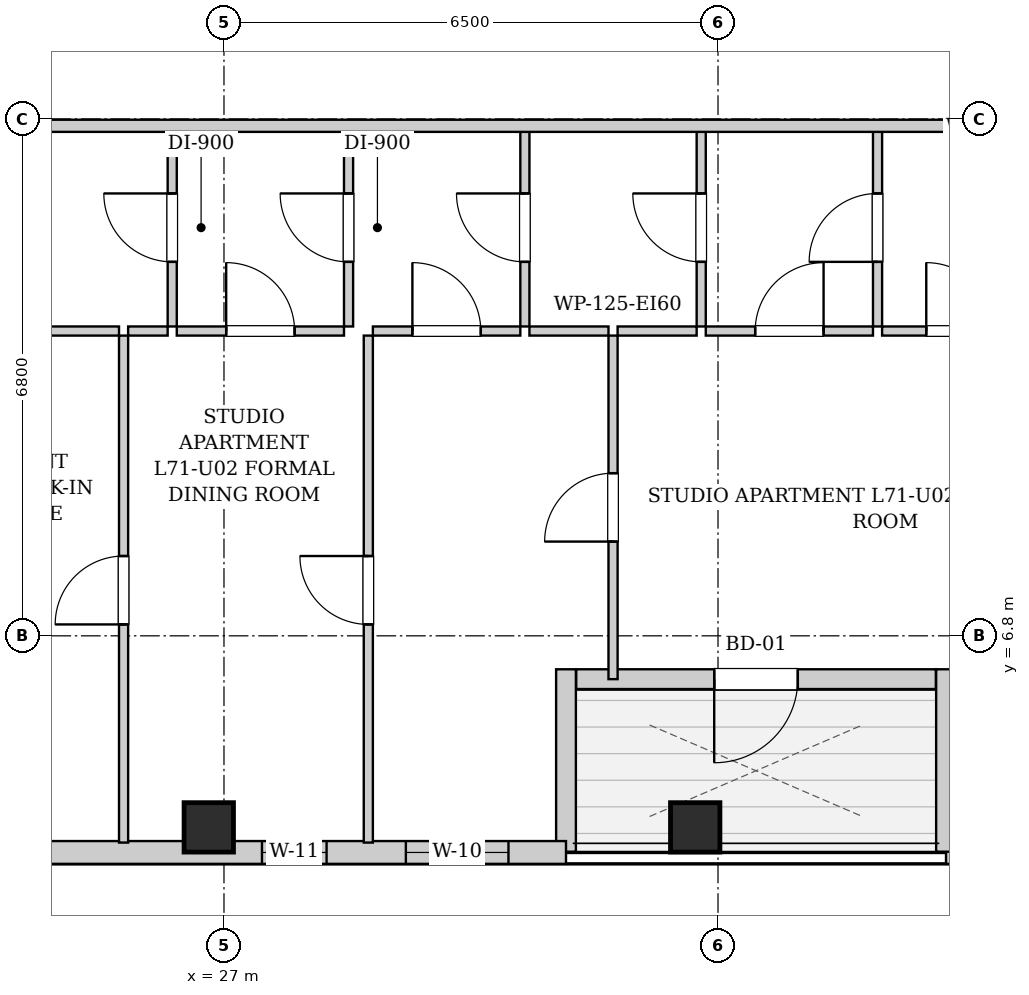
"""IFC4 building model, lengths in metres.
Left out: names, types, materials, properties, quantities, classifications, styles, units other than length and angle.
Written with IfcOpenShell. Run it as: python <this file> out.ifc"""

import sys

from ifc_helpers import new_model, si_unit, direction, frame, frame_2d, origin, origin_2d, place, context, subcontext, project, spatial, rectangle, extrude, element, fill, save


model = new_model("IFC4")
c1 = context("Model", 3, precision=1e-05, world=origin(), true_north=direction((0.0, 1.0)))
c2 = subcontext(c1, "Body", "Model", "MODEL_VIEW")
j1 = project(units=[si_unit("LENGTHUNIT", "METRE"), si_unit("PLANEANGLEUNIT", "RADIAN")], contexts=[c1])
p1 = place(None, origin())
s1 = spatial("IfcSite", under=j1, at=p1, CompositionType="ELEMENT")
p2 = place(p1, origin())
s2 = spatial("IfcBuilding", under=s1, at=p2, CompositionType="ELEMENT")
p3 = place(p2, frame((0.0, 0.0, 244.5)))
s3 = spatial("IfcBuildingStorey", under=s2, at=p3, CompositionType="ELEMENT", Elevation=244.5)
for number, where, z_axis, x_axis in (
    (1, (26.8, 4.28, 0.0), (0.0, 0.0, 1.0), (1.0, 0.0, 0.0)),
    (2, (33.2, 4.28, 0.0), (0.0, 0.0, 1.0), (1.0, 0.0, 0.0)),
):
    element("IfcColumn", number, at=place(p3, frame(where, z_axis=z_axis, x_axis=x_axis)), inside=s3, PredefinedType="COLUMN", context=c2, shape_type="SweptSolid", body=[
        extrude(rectangle(XDim=0.65, YDim=0.65, at=origin_2d()), origin(), (0.0, 0.0, 1.0), 3.4),
    ])
p4 = place(p3, frame((37.8, 3.95, 0.0), z_axis=(0.0, 0.0, 1.0), x_axis=(-1.0, 0.0, 0.0)))
e3 = element("IfcWall", 3, at=p4, inside=s3, PredefinedType="SOLIDWALL", context=c2, shape_type="SweptSolid", body=[
    extrude(rectangle(XDim=1.3, YDim=0.3, at=frame_2d((0.65, 0.0))), origin(), (0.0, 0.0, 1.0), 3.14),
])
p5 = place(p3, frame((36.5, 3.96, 0.0), z_axis=(0.0, 0.0, 1.0), x_axis=(0.0, 1.0, 0.0)))
e4 = element("IfcWall", 4, at=p5, inside=s3, PredefinedType="SOLIDWALL", context=c2, shape_type="SweptSolid", body=[
    extrude(rectangle(XDim=2.4, YDim=0.26, at=frame_2d((1.2, 0.0))), origin(), (0.0, 0.0, 1.0), 3.14),
])
p6 = place(p3, frame((36.366, 6.23, 0.0), z_axis=(0.0, 0.0, 1.0), x_axis=(-1.0, 0.0, 0.0)))
e5 = element("IfcWall", 5, at=p6, inside=s3, PredefinedType="SOLIDWALL", context=c2, shape_type="SweptSolid", body=[
    extrude(rectangle(XDim=4.732, YDim=0.26, at=frame_2d((2.366, 0.0))), origin(), (0.0, 0.0, 1.0), 3.14),
])
p7 = place(p6, frame((1.816, 0.0, 0.0)))
e6 = element("IfcOpeningElement", 6, at=p7, cuts=e5, PredefinedType="OPENING", context=c2, shape_type="SweptSolid", body=[
    extrude(rectangle(XDim=1.1, YDim=2.0, at=frame_2d((0.55, 1.0))), frame((0.0, 0.14, 0.0), z_axis=(0.0, -1.0, 0.0), x_axis=(1.0, 0.0, 0.0)), (0.0, 0.0, 1.0), 0.28),
])
p8 = place(p3, frame((31.5, 6.36, 0.0), z_axis=(0.0, 0.0, 1.0), x_axis=(0.0, -1.0, 0.0)))
e7 = element("IfcWall", 7, at=p8, inside=s3, PredefinedType="SOLIDWALL", context=c2, shape_type="SweptSolid", body=[
    extrude(rectangle(XDim=2.4, YDim=0.26, at=frame_2d((1.2, 0.0))), origin(), (0.0, 0.0, 1.0), 3.14),
])
p9 = place(p3, frame((31.5, 3.95, 0.0), z_axis=(0.0, 0.0, 1.0), x_axis=(-1.0, 0.0, 0.0)))
e8 = element("IfcWall", 8, at=p9, inside=s3, PredefinedType="SOLIDWALL", context=c2, shape_type="SweptSolid", body=[
    extrude(rectangle(XDim=10.1, YDim=0.3, at=frame_2d((5.05, 0.0))), origin(), (0.0, 0.0, 1.0), 3.14),
])
p10 = place(p9, frame((3.15, 0.0, 0.55)))
e9 = element("IfcOpeningElement", 9, at=p10, cuts=e8, PredefinedType="OPENING", context=c2, shape_type="SweptSolid", body=[
    extrude(rectangle(XDim=0.85, YDim=1.2, at=frame_2d((0.425, 0.6))), frame((0.0, 0.16, 0.0), z_axis=(0.0, -1.0, 0.0), x_axis=(1.0, 0.0, 0.0)), (0.0, 0.0, 1.0), 0.32),
])
p11 = place(p9, frame((0.757, 0.0, 0.55)))
e10 = element("IfcOpeningElement", 10, at=p11, cuts=e8, PredefinedType="OPENING", context=c2, shape_type="SweptSolid", body=[
    extrude(rectangle(XDim=1.35, YDim=1.2, at=frame_2d((0.675, 0.6))), frame((0.0, 0.16, 0.0), z_axis=(0.0, -1.0, 0.0), x_axis=(1.0, 0.0, 0.0)), (0.0, 0.0, 1.0), 0.32),
])
p12 = place(p3, frame((26.319, 10.87, 0.0), z_axis=(0.0, 0.0, 1.0), x_axis=(0.0, 1.0, 0.0)))
e11 = element("IfcWall", 11, at=p12, inside=s3, PredefinedType="PARTITIONING", context=c2, shape_type="SweptSolid", body=[
    extrude(rectangle(XDim=2.6, YDim=0.12, at=frame_2d((1.3, 0.0))), origin(), (0.0, 0.0, 1.0), 3.14),
])
p13 = place(p12, frame((0.85, 0.0, 0.0)))
e12 = element("IfcOpeningElement", 12, at=p13, cuts=e11, PredefinedType="OPENING", context=c2, shape_type="SweptSolid", body=[
    extrude(rectangle(XDim=0.9, YDim=2.05, at=frame_2d((0.45, 1.025))), frame((0.0, 0.07, 0.0), z_axis=(0.0, -1.0, 0.0), x_axis=(1.0, 0.0, 0.0)), (0.0, 0.0, 1.0), 0.14),
])
p14 = place(p3, frame((22.519, 10.81, 0.0), z_axis=(0.0, 0.0, 1.0), x_axis=(1.0, 0.0, 0.0)))
e13 = element("IfcWall", 13, at=p14, inside=s3, PredefinedType="PARTITIONING", context=c2, shape_type="SweptSolid", body=[
    extrude(rectangle(XDim=3.1, YDim=0.12, at=frame_2d((1.55, 0.0))), origin(), (0.0, 0.0, 1.0), 3.14),
])
p15 = place(p14, frame((1.1, 0.0, 0.0)))
e14 = element("IfcOpeningElement", 14, at=p15, cuts=e13, PredefinedType="OPENING", context=c2, shape_type="SweptSolid", body=[
    extrude(rectangle(XDim=0.9, YDim=2.05, at=frame_2d((0.45, 1.025))), frame((0.0, 0.07, 0.0), z_axis=(0.0, -1.0, 0.0), x_axis=(1.0, 0.0, 0.0)), (0.0, 0.0, 1.0), 0.14),
])
p16 = place(p3, frame((25.739, 10.81, 0.0), z_axis=(0.0, 0.0, 1.0), x_axis=(1.0, 0.0, 0.0)))
e15 = element("IfcWall", 15, at=p16, inside=s3, PredefinedType="PARTITIONING", context=c2, shape_type="SweptSolid", body=[
    extrude(rectangle(XDim=0.52, YDim=0.12, at=frame_2d((0.26, 0.0))), origin(), (0.0, 0.0, 1.0), 3.14),
])
p17 = place(p3, frame((28.639, 10.87, 0.0), z_axis=(0.0, 0.0, 1.0), x_axis=(0.0, 1.0, 0.0)))
e16 = element("IfcWall", 16, at=p17, inside=s3, PredefinedType="PARTITIONING", context=c2, shape_type="SweptSolid", body=[
    extrude(rectangle(XDim=2.6, YDim=0.12, at=frame_2d((1.3, 0.0))), origin(), (0.0, 0.0, 1.0), 3.14),
])
p18 = place(p17, frame((0.85, 0.0, 0.0)))
e17 = element("IfcOpeningElement", 17, at=p18, cuts=e16, PredefinedType="OPENING", context=c2, shape_type="SweptSolid", body=[
    extrude(rectangle(XDim=0.9, YDim=2.05, at=frame_2d((0.45, 1.025))), frame((0.0, 0.07, 0.0), z_axis=(0.0, -1.0, 0.0), x_axis=(1.0, 0.0, 0.0)), (0.0, 0.0, 1.0), 0.14),
])
p19 = place(p3, frame((26.379, 10.81, 0.0), z_axis=(0.0, 0.0, 1.0), x_axis=(1.0, 0.0, 0.0)))
e18 = element("IfcWall", 18, at=p19, inside=s3, PredefinedType="PARTITIONING", context=c2, shape_type="SweptSolid", body=[
    extrude(rectangle(XDim=2.2, YDim=0.12, at=frame_2d((1.1, 0.0))), origin(), (0.0, 0.0, 1.0), 3.14),
])
p20 = place(p19, frame((0.65, 0.0, 0.0)))
e19 = element("IfcOpeningElement", 19, at=p20, cuts=e18, PredefinedType="OPENING", context=c2, shape_type="SweptSolid", body=[
    extrude(rectangle(XDim=0.9, YDim=2.05, at=frame_2d((0.45, 1.025))), frame((0.0, 0.07, 0.0), z_axis=(0.0, -1.0, 0.0), x_axis=(1.0, 0.0, 0.0)), (0.0, 0.0, 1.0), 0.14),
])
p21 = place(p3, frame((30.959, 10.87, 0.0), z_axis=(0.0, 0.0, 1.0), x_axis=(0.0, 1.0, 0.0)))
e20 = element("IfcWall", 20, at=p21, inside=s3, PredefinedType="PARTITIONING", context=c2, shape_type="SweptSolid", body=[
    extrude(rectangle(XDim=2.6, YDim=0.12, at=frame_2d((1.3, 0.0))), origin(), (0.0, 0.0, 1.0), 3.14),
])
p22 = place(p21, frame((0.85, 0.0, 0.0)))
e21 = element("IfcOpeningElement", 21, at=p22, cuts=e20, PredefinedType="OPENING", context=c2, shape_type="SweptSolid", body=[
    extrude(rectangle(XDim=0.9, YDim=2.05, at=frame_2d((0.45, 1.025))), frame((0.0, 0.07, 0.0), z_axis=(0.0, -1.0, 0.0), x_axis=(1.0, 0.0, 0.0)), (0.0, 0.0, 1.0), 0.14),
])
p23 = place(p3, frame((28.959, 10.81, 0.0), z_axis=(0.0, 0.0, 1.0), x_axis=(1.0, 0.0, 0.0)))
e22 = element("IfcWall", 22, at=p23, inside=s3, PredefinedType="PARTITIONING", context=c2, shape_type="SweptSolid", body=[
    extrude(rectangle(XDim=1.94, YDim=0.12, at=frame_2d((0.97, 0.0))), origin(), (0.0, 0.0, 1.0), 3.14),
])
p24 = place(p23, frame((0.52, 0.0, 0.0)))
e23 = element("IfcOpeningElement", 23, at=p24, cuts=e22, PredefinedType="OPENING", context=c2, shape_type="SweptSolid", body=[
    extrude(rectangle(XDim=0.9, YDim=2.05, at=frame_2d((0.45, 1.025))), frame((0.0, 0.07, 0.0), z_axis=(0.0, -1.0, 0.0), x_axis=(1.0, 0.0, 0.0)), (0.0, 0.0, 1.0), 0.14),
])
p25 = place(p3, frame((33.279, 10.87, 0.0), z_axis=(0.0, 0.0, 1.0), x_axis=(0.0, 1.0, 0.0)))
e24 = element("IfcWall", 24, at=p25, inside=s3, PredefinedType="PARTITIONING", context=c2, shape_type="SweptSolid", body=[
    extrude(rectangle(XDim=2.6, YDim=0.12, at=frame_2d((1.3, 0.0))), origin(), (0.0, 0.0, 1.0), 2.668),
])
p26 = place(p25, frame((0.85, 0.0, 0.0)))
e25 = element("IfcOpeningElement", 25, at=p26, cuts=e24, PredefinedType="OPENING", context=c2, shape_type="SweptSolid", body=[
    extrude(rectangle(XDim=0.9, YDim=2.05, at=frame_2d((0.45, 1.025))), frame((0.0, 0.07, 0.0), z_axis=(0.0, -1.0, 0.0), x_axis=(1.0, 0.0, 0.0)), (0.0, 0.0, 1.0), 0.14),
])
for number, where, z_axis, x_axis in (
    (26, (31.019, 10.81, 0.0), (0.0, 0.0, 1.0), (1.0, 0.0, 0.0)),
    (27, (32.179, 10.81, 0.0), (0.0, 0.0, 1.0), (1.0, 0.0, 0.0)),
):
    element("IfcWall", number, at=place(p3, frame(where, z_axis=z_axis, x_axis=x_axis)), inside=s3, PredefinedType="PARTITIONING", context=c2, shape_type="SweptSolid", body=[
        extrude(rectangle(XDim=1.04, YDim=0.12, at=frame_2d((0.52, 0.0))), origin(), (0.0, 0.0, 1.0), 3.14),
    ])
p27 = place(p3, frame((35.599, 10.87, 0.0), z_axis=(0.0, 0.0, 1.0), x_axis=(0.0, 1.0, 0.0)))
e28 = element("IfcWall", 28, at=p27, inside=s3, PredefinedType="PARTITIONING", context=c2, shape_type="SweptSolid", body=[
    extrude(rectangle(XDim=2.6, YDim=0.12, at=frame_2d((1.3, 0.0))), origin(), (0.0, 0.0, 1.0), 3.14),
])
p28 = place(p27, frame((0.85, 0.0, 0.0)))
e29 = element("IfcOpeningElement", 29, at=p28, cuts=e28, PredefinedType="OPENING", context=c2, shape_type="SweptSolid", body=[
    extrude(rectangle(XDim=0.9, YDim=2.05, at=frame_2d((0.45, 1.025))), frame((0.0, 0.07, 0.0), z_axis=(0.0, -1.0, 0.0), x_axis=(1.0, 0.0, 0.0)), (0.0, 0.0, 1.0), 0.14),
])
p29 = place(p3, frame((33.339, 10.81, 0.0), z_axis=(0.0, 0.0, 1.0), x_axis=(1.0, 0.0, 0.0)))
e30 = element("IfcWall", 30, at=p29, inside=s3, PredefinedType="PARTITIONING", context=c2, shape_type="SweptSolid", body=[
    extrude(rectangle(XDim=2.2, YDim=0.12, at=frame_2d((1.1, 0.0))), origin(), (0.0, 0.0, 1.0), 3.14),
])
p30 = place(p29, frame((0.65, 0.0, 0.0)))
e31 = element("IfcOpeningElement", 31, at=p30, cuts=e30, PredefinedType="OPENING", context=c2, shape_type="SweptSolid", body=[
    extrude(rectangle(XDim=0.9, YDim=2.05, at=frame_2d((0.45, 1.025))), frame((0.0, 0.07, 0.0), z_axis=(0.0, -1.0, 0.0), x_axis=(1.0, 0.0, 0.0)), (0.0, 0.0, 1.0), 0.14),
])
p31 = place(p3, frame((35.659, 10.81, 0.0), z_axis=(0.0, 0.0, 1.0), x_axis=(1.0, 0.0, 0.0)))
e32 = element("IfcWall", 32, at=p31, inside=s3, PredefinedType="PARTITIONING", context=c2, shape_type="SweptSolid", body=[
    extrude(rectangle(XDim=2.061, YDim=0.12, at=frame_2d((1.031, 0.0))), origin(), (0.0, 0.0, 1.0), 3.14),
])
p32 = place(p31, frame((0.581, 0.0, 0.0)))
e33 = element("IfcOpeningElement", 33, at=p32, cuts=e32, PredefinedType="OPENING", context=c2, shape_type="SweptSolid", body=[
    extrude(rectangle(XDim=0.9, YDim=2.05, at=frame_2d((0.45, 1.025))), frame((0.0, 0.07, 0.0), z_axis=(0.0, -1.0, 0.0), x_axis=(1.0, 0.0, 0.0)), (0.0, 0.0, 1.0), 0.14),
])
p33 = place(p3, frame((25.679, 4.08, 0.0), z_axis=(0.0, 0.0, 1.0), x_axis=(0.0, 1.0, 0.0)))
e34 = element("IfcWall", 34, at=p33, inside=s3, PredefinedType="PARTITIONING", context=c2, shape_type="SweptSolid", body=[
    extrude(rectangle(XDim=6.67, YDim=0.12, at=frame_2d((3.335, 0.0))), origin(), (0.0, 0.0, 1.0), 3.14),
])
p34 = place(p33, frame((2.87, 0.0, 0.0)))
e35 = element("IfcOpeningElement", 35, at=p34, cuts=e34, PredefinedType="OPENING", context=c2, shape_type="SweptSolid", body=[
    extrude(rectangle(XDim=0.9, YDim=2.05, at=frame_2d((0.45, 1.025))), frame((0.0, 0.07, 0.0), z_axis=(0.0, -1.0, 0.0), x_axis=(1.0, 0.0, 0.0)), (0.0, 0.0, 1.0), 0.14),
])
p35 = place(p3, frame((28.899, 4.08, 0.0), z_axis=(0.0, 0.0, 1.0), x_axis=(0.0, 1.0, 0.0)))
e36 = element("IfcWall", 36, at=p35, inside=s3, PredefinedType="PARTITIONING", context=c2, shape_type="SweptSolid", body=[
    extrude(rectangle(XDim=6.67, YDim=0.12, at=frame_2d((3.335, 0.0))), origin(), (0.0, 0.0, 1.0), 3.14),
])
p36 = place(p35, frame((2.87, 0.0, 0.0)))
e37 = element("IfcOpeningElement", 37, at=p36, cuts=e36, PredefinedType="OPENING", context=c2, shape_type="SweptSolid", body=[
    extrude(rectangle(XDim=0.9, YDim=2.05, at=frame_2d((0.45, 1.025))), frame((0.0, 0.07, 0.0), z_axis=(0.0, -1.0, 0.0), x_axis=(1.0, 0.0, 0.0)), (0.0, 0.0, 1.0), 0.14),
])
p37 = place(p3, frame((32.119, 6.23, 0.0), z_axis=(0.0, 0.0, 1.0), x_axis=(0.0, 1.0, 0.0)))
e38 = element("IfcWall", 38, at=p37, inside=s3, PredefinedType="PARTITIONING", context=c2, shape_type="SweptSolid", body=[
    extrude(rectangle(XDim=4.52, YDim=0.12, at=frame_2d((2.26, 0.0))), origin(), (0.0, 0.0, 1.0), 3.14),
])
p38 = place(p37, frame((1.81, 0.0, 0.0)))
e39 = element("IfcOpeningElement", 39, at=p38, cuts=e38, PredefinedType="OPENING", context=c2, shape_type="SweptSolid", body=[
    extrude(rectangle(XDim=0.9, YDim=2.05, at=frame_2d((0.45, 1.025))), frame((0.0, 0.07, 0.0), z_axis=(0.0, -1.0, 0.0), x_axis=(1.0, 0.0, 0.0)), (0.0, 0.0, 1.0), 0.14),
])
p39 = place(p3, frame((13.15, 13.51, 0.0), z_axis=(0.0, 0.0, 1.0), x_axis=(1.0, 0.0, 0.0)))
e40 = element("IfcWall", 40, at=p39, inside=s3, PredefinedType="PARTITIONING", context=c2, shape_type="SweptSolid", body=[
    extrude(rectangle(XDim=24.6, YDim=0.16, at=frame_2d((12.3, 0.0))), origin(), (0.0, 0.0, 1.0), 3.14),
])
p40 = place(p39, frame((3.165, 0.0, 0.0)))
e41 = element("IfcOpeningElement", 41, at=p40, cuts=e40, PredefinedType="OPENING", context=c2, shape_type="SweptSolid", body=[
    extrude(rectangle(XDim=0.95, YDim=2.1, at=frame_2d((0.475, 1.05))), frame((0.0, 0.09, 0.0), z_axis=(0.0, -1.0, 0.0), x_axis=(1.0, 0.0, 0.0)), (0.0, 0.0, 1.0), 0.18),
])
p41 = place(p39, frame((10.414, 0.0, 0.0)))
e42 = element("IfcOpeningElement", 42, at=p41, cuts=e40, PredefinedType="OPENING", context=c2, shape_type="SweptSolid", body=[
    extrude(rectangle(XDim=0.95, YDim=2.1, at=frame_2d((0.475, 1.05))), frame((0.0, 0.09, 0.0), z_axis=(0.0, -1.0, 0.0), x_axis=(1.0, 0.0, 0.0)), (0.0, 0.0, 1.0), 0.18),
])
p42 = place(p13, origin())
e43 = element("IfcDoor", 43, at=p42, inside=s3, OperationType="SINGLE_SWING_RIGHT", PredefinedType="DOOR", context=c2, shape_type="SweptSolid", body=[
    extrude(rectangle(XDim=0.9, YDim=2.05, at=frame_2d((0.45, 1.025))), frame((0.0, 0.025, 0.0), z_axis=(0.0, -1.0, 0.0), x_axis=(1.0, 0.0, 0.0)), (0.0, 0.0, 1.0), 0.05),
])
fill(e12, e43)
p43 = place(p18, origin())
e44 = element("IfcDoor", 44, at=p43, inside=s3, OperationType="SINGLE_SWING_RIGHT", PredefinedType="DOOR", context=c2, shape_type="SweptSolid", body=[
    extrude(rectangle(XDim=0.9, YDim=2.05, at=frame_2d((0.45, 1.025))), frame((0.0, 0.025, 0.0), z_axis=(0.0, -1.0, 0.0), x_axis=(1.0, 0.0, 0.0)), (0.0, 0.0, 1.0), 0.05),
])
fill(e17, e44)
p44 = place(p20, origin())
e45 = element("IfcDoor", 45, at=p44, inside=s3, OperationType="SINGLE_SWING_LEFT", PredefinedType="DOOR", context=c2, shape_type="SweptSolid", body=[
    extrude(rectangle(XDim=0.9, YDim=2.05, at=frame_2d((0.45, 1.025))), frame((0.0, 0.025, 0.0), z_axis=(0.0, -1.0, 0.0), x_axis=(1.0, 0.0, 0.0)), (0.0, 0.0, 1.0), 0.05),
])
fill(e19, e45)
p45 = place(p22, origin())
e46 = element("IfcDoor", 46, at=p45, inside=s3, OperationType="SINGLE_SWING_RIGHT", PredefinedType="DOOR", context=c2, shape_type="SweptSolid", body=[
    extrude(rectangle(XDim=0.9, YDim=2.05, at=frame_2d((0.45, 1.025))), frame((0.0, 0.025, 0.0), z_axis=(0.0, -1.0, 0.0), x_axis=(1.0, 0.0, 0.0)), (0.0, 0.0, 1.0), 0.05),
])
fill(e21, e46)
p46 = place(p24, origin())
e47 = element("IfcDoor", 47, at=p46, inside=s3, OperationType="SINGLE_SWING_LEFT", PredefinedType="DOOR", context=c2, shape_type="SweptSolid", body=[
    extrude(rectangle(XDim=0.9, YDim=2.05, at=frame_2d((0.45, 1.025))), frame((0.0, 0.025, 0.0), z_axis=(0.0, -1.0, 0.0), x_axis=(1.0, 0.0, 0.0)), (0.0, 0.0, 1.0), 0.05),
])
fill(e23, e47)
p47 = place(p26, origin())
e48 = element("IfcDoor", 48, at=p47, inside=s3, OperationType="SINGLE_SWING_RIGHT", PredefinedType="DOOR", context=c2, shape_type="SweptSolid", body=[
    extrude(rectangle(XDim=0.9, YDim=2.05, at=frame_2d((0.45, 1.025))), frame((0.0, 0.025, 0.0), z_axis=(0.0, -1.0, 0.0), x_axis=(1.0, 0.0, 0.0)), (0.0, 0.0, 1.0), 0.05),
])
fill(e25, e48)
p48 = place(p28, origin())
e49 = element("IfcDoor", 49, at=p48, inside=s3, OperationType="SINGLE_SWING_LEFT", PredefinedType="DOOR", context=c2, shape_type="SweptSolid", body=[
    extrude(rectangle(XDim=0.9, YDim=2.05, at=frame_2d((0.45, 1.025))), frame((0.0, 0.025, 0.0), z_axis=(0.0, -1.0, 0.0), x_axis=(1.0, 0.0, 0.0)), (0.0, 0.0, 1.0), 0.05),
])
fill(e29, e49)
p49 = place(p30, origin())
e50 = element("IfcDoor", 50, at=p49, inside=s3, OperationType="SINGLE_SWING_RIGHT", PredefinedType="DOOR", context=c2, shape_type="SweptSolid", body=[
    extrude(rectangle(XDim=0.9, YDim=2.05, at=frame_2d((0.45, 1.025))), frame((0.0, 0.025, 0.0), z_axis=(0.0, -1.0, 0.0), x_axis=(1.0, 0.0, 0.0)), (0.0, 0.0, 1.0), 0.05),
])
fill(e31, e50)
p50 = place(p32, origin())
e51 = element("IfcDoor", 51, at=p50, inside=s3, OperationType="SINGLE_SWING_LEFT", PredefinedType="DOOR", context=c2, shape_type="SweptSolid", body=[
    extrude(rectangle(XDim=0.9, YDim=2.05, at=frame_2d((0.45, 1.025))), frame((0.0, 0.025, 0.0), z_axis=(0.0, -1.0, 0.0), x_axis=(1.0, 0.0, 0.0)), (0.0, 0.0, 1.0), 0.05),
])
fill(e33, e51)
p51 = place(p34, origin())
e52 = element("IfcDoor", 52, at=p51, inside=s3, OperationType="SINGLE_SWING_LEFT", PredefinedType="DOOR", context=c2, shape_type="SweptSolid", body=[
    extrude(rectangle(XDim=0.9, YDim=2.05, at=frame_2d((0.45, 1.025))), frame((0.0, 0.025, 0.0), z_axis=(0.0, -1.0, 0.0), x_axis=(1.0, 0.0, 0.0)), (0.0, 0.0, 1.0), 0.05),
])
fill(e35, e52)
p52 = place(p36, origin())
e53 = element("IfcDoor", 53, at=p52, inside=s3, OperationType="SINGLE_SWING_RIGHT", PredefinedType="DOOR", context=c2, shape_type="SweptSolid", body=[
    extrude(rectangle(XDim=0.9, YDim=2.05, at=frame_2d((0.45, 1.025))), frame((0.0, 0.025, 0.0), z_axis=(0.0, -1.0, 0.0), x_axis=(1.0, 0.0, 0.0)), (0.0, 0.0, 1.0), 0.05),
])
fill(e37, e53)
p53 = place(p38, origin())
e54 = element("IfcDoor", 54, at=p53, inside=s3, OperationType="SINGLE_SWING_LEFT", PredefinedType="DOOR", context=c2, shape_type="SweptSolid", body=[
    extrude(rectangle(XDim=0.9, YDim=2.05, at=frame_2d((0.45, 1.025))), frame((0.0, 0.025, 0.0), z_axis=(0.0, -1.0, 0.0), x_axis=(1.0, 0.0, 0.0)), (0.0, 0.0, 1.0), 0.05),
])
fill(e39, e54)
p54 = place(p7, origin())
e55 = element("IfcDoor", 55, at=p54, inside=s3, OperationType="SINGLE_SWING_RIGHT", PredefinedType="DOOR", context=c2, shape_type="SweptSolid", body=[
    extrude(rectangle(XDim=1.1, YDim=2.0, at=frame_2d((0.55, 1.0))), frame((0.0, 0.025, 0.0), z_axis=(0.0, -1.0, 0.0), x_axis=(1.0, 0.0, 0.0)), (0.0, 0.0, 1.0), 0.05),
])
fill(e6, e55)
p55 = place(p10, origin())
e56 = element("IfcWindow", 56, at=p55, inside=s3, PartitioningType="SINGLE_PANEL", PredefinedType="WINDOW", context=c2, shape_type="SweptSolid", body=[
    extrude(rectangle(XDim=0.85, YDim=1.2, at=frame_2d((0.425, 0.6))), frame((0.0, 0.03, 0.0), z_axis=(0.0, -1.0, 0.0), x_axis=(1.0, 0.0, 0.0)), (0.0, 0.0, 1.0), 0.06),
])
fill(e9, e56)
p56 = place(p11, origin())
e57 = element("IfcWindow", 57, at=p56, inside=s3, PartitioningType="SINGLE_PANEL", PredefinedType="WINDOW", context=c2, shape_type="SweptSolid", body=[
    extrude(rectangle(XDim=1.35, YDim=1.2, at=frame_2d((0.675, 0.6))), frame((0.0, 0.03, 0.0), z_axis=(0.0, -1.0, 0.0), x_axis=(1.0, 0.0, 0.0)), (0.0, 0.0, 1.0), 0.06),
])
fill(e10, e57)
save(model, sys.argv[1])
